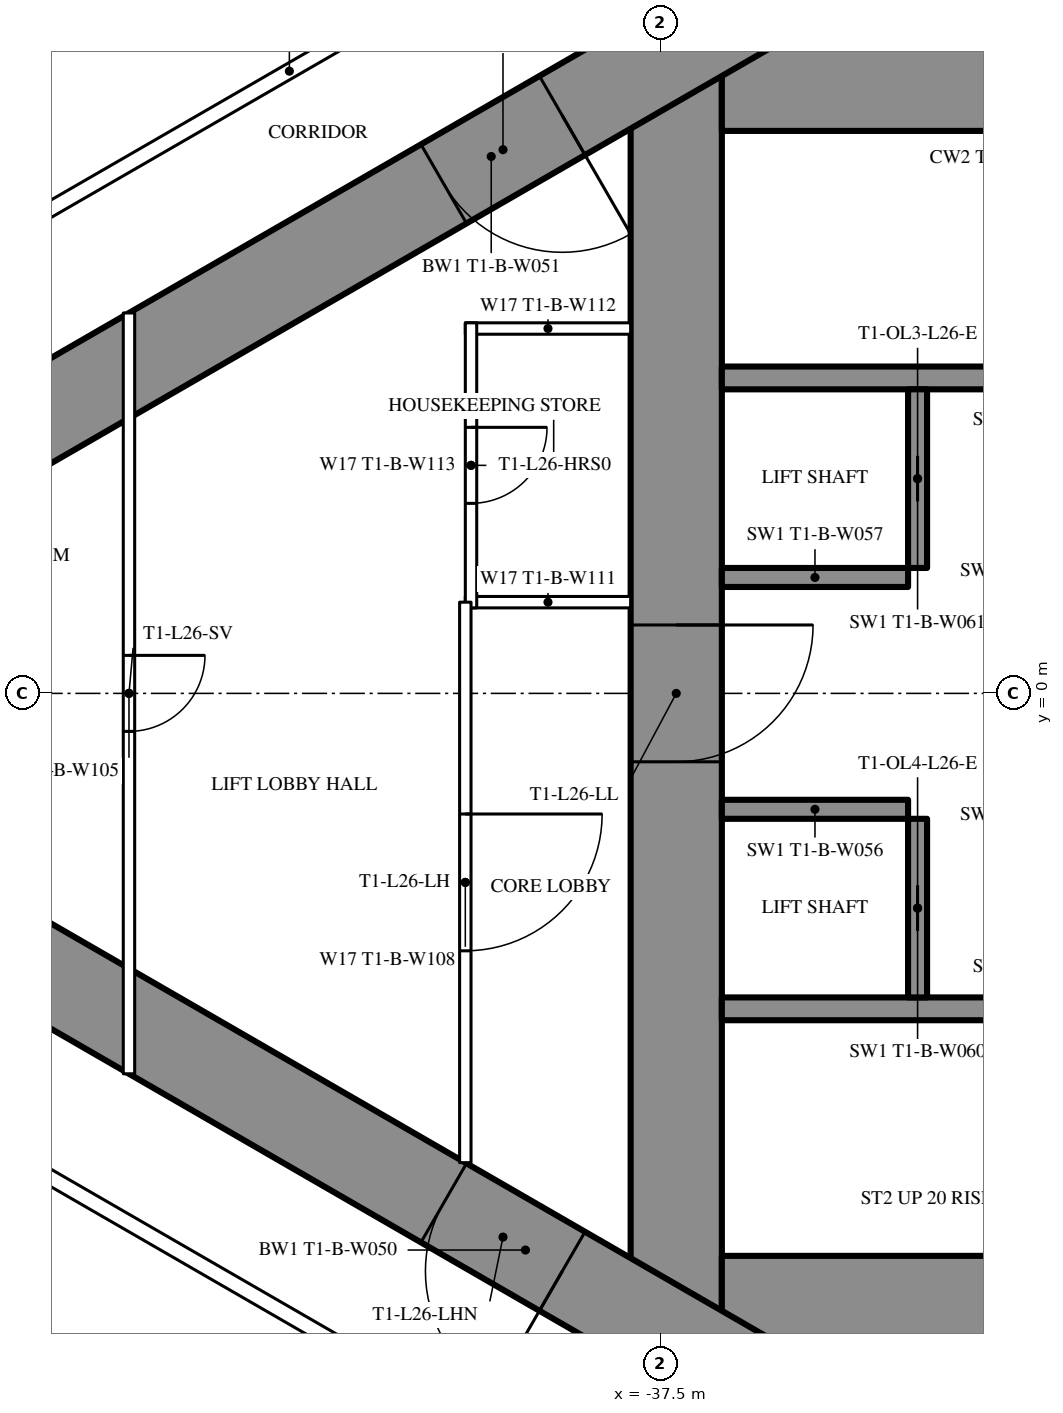
"""IFC4 building model, lengths in metres.
Left out: names, types, materials, properties, quantities, classifications, styles, units other than length and angle.
Written with IfcOpenShell. Run it as: python <this file> out.ifc"""

import sys

from ifc_helpers import new_model, si_unit, direction, frame, frame_2d, origin, place, context, subcontext, project, spatial, rectangle, extrude, element, fill, save


model = new_model("IFC4")
c1 = context("Model", 3, precision=1e-05, world=origin(), true_north=direction((0.0, 1.0)))
c2 = subcontext(c1, "Body", "Model", "MODEL_VIEW")
j1 = project(units=[si_unit("LENGTHUNIT", "METRE"), si_unit("PLANEANGLEUNIT", "RADIAN")], contexts=[c1])
p1 = place(None, origin())
s1 = spatial("IfcSite", under=j1, at=p1, CompositionType="ELEMENT")
p2 = place(p1, origin())
s2 = spatial("IfcBuilding", under=s1, at=p2, CompositionType="ELEMENT")
p3 = place(p2, frame((0.0, 0.0, 101.1)))
s3 = spatial("IfcBuildingStorey", under=s2, at=p3, CompositionType="ELEMENT", Elevation=101.1)
p4 = place(p3, frame((-37.3, 8.6, 0.0), z_axis=(0.0, 0.0, 1.0), x_axis=(0.0, -1.0, 0.0)))
e1 = element("IfcWall", 1, at=p4, inside=s3, PredefinedType="SHEAR", context=c2, shape_type="SweptSolid", body=[
    extrude(rectangle(XDim=17.2, YDim=1.2, at=frame_2d((8.6, 0.0))), origin(), (0.0, 0.0, 1.0), 3.5),
])
p5 = place(p4, frame((7.7, 0.0, 0.0)))
e2 = element("IfcOpeningElement", 2, at=p5, cuts=e1, PredefinedType="OPENING", context=c2, shape_type="SweptSolid", body=[
    extrude(rectangle(XDim=1.8, YDim=2.2, at=frame_2d((0.9, 1.1))), frame((0.0, 0.61, 0.0), z_axis=(0.0, -1.0, 0.0), x_axis=(1.0, 0.0, 0.0)), (0.0, 0.0, 1.0), 1.22),
])
p6 = place(p3, frame((-28.3, 8.0, 0.0), z_axis=(0.0, 0.0, 1.0), x_axis=(-1.0, 0.0, 0.0)))
e3 = element("IfcWall", 3, at=p6, inside=s3, PredefinedType="SHEAR", context=c2, shape_type="SweptSolid", body=[
    extrude(rectangle(XDim=8.4, YDim=1.2, at=frame_2d((4.2, 0.0))), origin(), (0.0, 0.0, 1.0), 3.5),
])
p7 = place(p6, frame((0.25, 0.0, 0.0)))
e4 = element("IfcOpeningElement", 4, at=p7, cuts=e3, PredefinedType="OPENING", context=c2, shape_type="SweptSolid", body=[
    extrude(rectangle(XDim=1.0, YDim=2.2, at=frame_2d((0.5, 1.1))), frame((0.0, 0.61, 0.0), z_axis=(0.0, -1.0, 0.0), x_axis=(1.0, 0.0, 0.0)), (0.0, 0.0, 1.0), 1.22),
])
p8 = place(p3, frame((-28.3, -8.0, 0.0), z_axis=(0.0, 0.0, 1.0), x_axis=(-1.0, 0.0, 0.0)))
e5 = element("IfcWall", 5, at=p8, inside=s3, PredefinedType="SHEAR", context=c2, shape_type="SweptSolid", body=[
    extrude(rectangle(XDim=8.4, YDim=1.2, at=frame_2d((4.2, 0.0))), origin(), (0.0, 0.0, 1.0), 3.5),
])
p9 = place(p8, frame((0.25, 0.0, 0.0)))
e6 = element("IfcOpeningElement", 6, at=p9, cuts=e5, PredefinedType="OPENING", context=c2, shape_type="SweptSolid", body=[
    extrude(rectangle(XDim=1.0, YDim=2.2, at=frame_2d((0.5, 1.1))), frame((0.0, 0.61, 0.0), z_axis=(0.0, -1.0, 0.0), x_axis=(1.0, 0.0, 0.0)), (0.0, 0.0, 1.0), 1.22),
])
for number, where, z_axis, x_axis in (
    (7, (-28.3, 4.15, 0.0), (0.0, 0.0, 1.0), (-1.0, 0.0, 0.0)),
    (8, (-28.3, -4.15, 0.0), (0.0, 0.0, 1.0), (-1.0, 0.0, 0.0)),
):
    element("IfcWall", number, at=place(p3, frame(where, z_axis=z_axis, x_axis=x_axis)), inside=s3, PredefinedType="SHEAR", context=c2, shape_type="SweptSolid", body=[
        extrude(rectangle(XDim=8.4, YDim=0.3, at=frame_2d((4.2, 0.0))), origin(), (0.0, 0.0, 1.0), 3.5),
    ])
p10 = place(p3, frame((-34.125, 4.0, 0.0), z_axis=(0.0, 0.0, 1.0), x_axis=(0.0, -1.0, 0.0)))
e9 = element("IfcWall", 9, at=p10, inside=s3, PredefinedType="SHEAR", context=c2, shape_type="SweptSolid", body=[
    extrude(rectangle(XDim=2.35, YDim=0.25, at=frame_2d((1.175, 0.0))), origin(), (0.0, 0.0, 1.0), 3.5),
])
p11 = place(p10, frame((0.875, 0.0, 0.0)))
e10 = element("IfcOpeningElement", 10, at=p11, cuts=e9, PredefinedType="OPENING", context=c2, shape_type="SweptSolid", body=[
    extrude(rectangle(XDim=0.6, YDim=2.0, at=frame_2d((0.3, 1.0))), frame((0.0, 0.135, 0.0), z_axis=(0.0, -1.0, 0.0), x_axis=(1.0, 0.0, 0.0)), (0.0, 0.0, 1.0), 0.27),
])
p12 = place(p3, frame((-34.25, 1.525, 0.0), z_axis=(0.0, 0.0, 1.0), x_axis=(-1.0, 0.0, 0.0)))
e11 = element("IfcWall", 11, at=p12, inside=s3, PredefinedType="SHEAR", context=c2, shape_type="SweptSolid", body=[
    extrude(rectangle(XDim=2.45, YDim=0.25, at=frame_2d((1.225, 0.0))), origin(), (0.0, 0.0, 1.0), 3.5),
])
p13 = place(p3, frame((-34.125, -1.65, 0.0), z_axis=(0.0, 0.0, 1.0), x_axis=(0.0, -1.0, 0.0)))
e12 = element("IfcWall", 12, at=p13, inside=s3, PredefinedType="SHEAR", context=c2, shape_type="SweptSolid", body=[
    extrude(rectangle(XDim=2.35, YDim=0.25, at=frame_2d((1.175, 0.0))), origin(), (0.0, 0.0, 1.0), 3.5),
])
p14 = place(p13, frame((0.875, 0.0, 0.0)))
e13 = element("IfcOpeningElement", 13, at=p14, cuts=e12, PredefinedType="OPENING", context=c2, shape_type="SweptSolid", body=[
    extrude(rectangle(XDim=0.6, YDim=2.0, at=frame_2d((0.3, 1.0))), frame((0.0, 0.135, 0.0), z_axis=(0.0, -1.0, 0.0), x_axis=(1.0, 0.0, 0.0)), (0.0, 0.0, 1.0), 0.27),
])
p15 = place(p3, frame((-34.25, -1.525, 0.0), z_axis=(0.0, 0.0, 1.0), x_axis=(-1.0, 0.0, 0.0)))
e14 = element("IfcWall", 14, at=p15, inside=s3, PredefinedType="SHEAR", context=c2, shape_type="SweptSolid", body=[
    extrude(rectangle(XDim=2.45, YDim=0.25, at=frame_2d((1.225, 0.0))), origin(), (0.0, 0.0, 1.0), 3.5),
])
p16 = place(p3, frame((-27.2, 14.3, 0.0), z_axis=(0.0, 0.0, 1.0), x_axis=(-0.866026593062, -0.499997940104, 0.0)))
e15 = element("IfcWall", 15, at=p16, inside=s3, PredefinedType="SHEAR", context=c2, shape_type="SweptSolid", body=[
    extrude(rectangle(XDim=28.946, YDim=1.2, at=frame_2d((14.473, 0.0))), origin(), (0.0, 0.0, 1.0), 3.5),
])
p17 = place(p16, frame((4.6, 0.0, 0.0)))
e16 = element("IfcOpeningElement", 16, at=p17, cuts=e15, PredefinedType="OPENING", context=c2, shape_type="SweptSolid", body=[
    extrude(rectangle(XDim=1.0, YDim=2.2, at=frame_2d((0.5, 1.1))), frame((0.0, 0.61, 0.0), z_axis=(0.0, -1.0, 0.0), x_axis=(1.0, 0.0, 0.0)), (0.0, 0.0, 1.0), 1.22),
])
p18 = place(p16, frame((13.395, 0.0, 0.0)))
e17 = element("IfcOpeningElement", 17, at=p18, cuts=e15, PredefinedType="OPENING", context=c2, shape_type="SweptSolid", body=[
    extrude(rectangle(XDim=1.8, YDim=2.2, at=frame_2d((0.9, 1.1))), frame((0.0, 0.61, 0.0), z_axis=(0.0, -1.0, 0.0), x_axis=(1.0, 0.0, 0.0)), (0.0, 0.0, 1.0), 1.22),
])
p19 = place(p3, frame((-27.2, -14.3, 0.0), z_axis=(0.0, 0.0, 1.0), x_axis=(-0.866024021859, 0.500002393557, 0.0)))
e18 = element("IfcWall", 18, at=p19, inside=s3, PredefinedType="SHEAR", context=c2, shape_type="SweptSolid", body=[
    extrude(rectangle(XDim=27.907, YDim=1.2, at=frame_2d((13.954, 0.0))), origin(), (0.0, 0.0, 1.0), 3.5),
])
p20 = place(p19, frame((4.6, 0.0, 0.0)))
e19 = element("IfcOpeningElement", 19, at=p20, cuts=e18, PredefinedType="OPENING", context=c2, shape_type="SweptSolid", body=[
    extrude(rectangle(XDim=1.0, YDim=2.2, at=frame_2d((0.5, 1.1))), frame((0.0, 0.61, 0.0), z_axis=(0.0, -1.0, 0.0), x_axis=(1.0, 0.0, 0.0)), (0.0, 0.0, 1.0), 1.22),
])
p21 = place(p19, frame((13.395, 0.0, 0.0)))
e20 = element("IfcOpeningElement", 20, at=p21, cuts=e18, PredefinedType="OPENING", context=c2, shape_type="SweptSolid", body=[
    extrude(rectangle(XDim=1.8, YDim=2.2, at=frame_2d((0.9, 1.1))), frame((0.0, 0.61, 0.0), z_axis=(0.0, -1.0, 0.0), x_axis=(1.0, 0.0, 0.0)), (0.0, 0.0, 1.0), 1.22),
])
p22 = place(p3, frame((-36.92, -11.344, 0.0), z_axis=(0.0, 0.0, 1.0), x_axis=(-0.866028313256, 0.499994960614, 0.0)))
e21 = element("IfcWall", 21, at=p22, inside=s3, PredefinedType="PARTITIONING", context=c2, shape_type="SweptSolid", body=[
    extrude(rectangle(XDim=22.568, YDim=0.2, at=frame_2d((11.284, 0.0))), origin(), (0.0, 0.0, 1.0), 3.25),
])
p23 = place(p22, frame((21.018, 0.0, 0.0)))
e22 = element("IfcOpeningElement", 22, at=p23, cuts=e21, PredefinedType="OPENING", context=c2, shape_type="SweptSolid", body=[
    extrude(rectangle(XDim=0.95, YDim=2.2, at=frame_2d((0.475, 1.1))), frame((0.0, 0.11, 0.0), z_axis=(0.0, -1.0, 0.0), x_axis=(1.0, 0.0, 0.0)), (0.0, 0.0, 1.0), 0.22),
])
p24 = place(p22, frame((3.35, 0.0, 0.0)))
e23 = element("IfcOpeningElement", 23, at=p24, cuts=e21, PredefinedType="OPENING", context=c2, shape_type="SweptSolid", body=[
    extrude(rectangle(XDim=1.0, YDim=2.2, at=frame_2d((0.5, 1.1))), frame((0.0, 0.11, 0.0), z_axis=(0.0, -1.0, 0.0), x_axis=(1.0, 0.0, 0.0)), (0.0, 0.0, 1.0), 0.22),
])
p25 = place(p3, frame((-37.7, 10.894, 0.0), z_axis=(0.0, 0.0, 1.0), x_axis=(-0.866027551079, -0.499996280759, 0.0)))
e24 = element("IfcWall", 24, at=p25, inside=s3, PredefinedType="PARTITIONING", context=c2, shape_type="SweptSolid", body=[
    extrude(rectangle(XDim=10.831, YDim=0.2, at=frame_2d((5.415, 0.0))), origin(), (0.0, 0.0, 1.0), 3.25),
])
p26 = place(p25, frame((0.6, 0.0, 0.0)))
e25 = element("IfcOpeningElement", 25, at=p26, cuts=e24, PredefinedType="OPENING", context=c2, shape_type="SweptSolid", body=[
    extrude(rectangle(XDim=0.95, YDim=2.2, at=frame_2d((0.475, 1.1))), frame((0.0, 0.11, 0.0), z_axis=(0.0, -1.0, 0.0), x_axis=(1.0, 0.0, 0.0)), (0.0, 0.0, 1.0), 0.22),
])
for number, where, z_axis, x_axis in (
    (26, (-37.9, 1.2, 0.0), (0.0, 0.0, 1.0), (-1.0, 0.0, 0.0)),
    (27, (-37.9, 4.8, 0.0), (0.0, 0.0, 1.0), (-1.0, 0.0, 0.0)),
):
    element("IfcWall", number, at=place(p3, frame(where, z_axis=z_axis, x_axis=x_axis)), inside=s3, PredefinedType="PARTITIONING", context=c2, shape_type="SweptSolid", body=[
        extrude(rectangle(XDim=2.175, YDim=0.15, at=frame_2d((1.087, 0.0))), origin(), (0.0, 0.0, 1.0), 3.25),
    ])
p27 = place(p3, frame((-40.0, 4.875, 0.0), z_axis=(0.0, 0.0, 1.0), x_axis=(0.0, -1.0, 0.0)))
e28 = element("IfcWall", 28, at=p27, inside=s3, PredefinedType="PARTITIONING", context=c2, shape_type="SweptSolid", body=[
    extrude(rectangle(XDim=3.75, YDim=0.15, at=frame_2d((1.875, 0.0))), origin(), (0.0, 0.0, 1.0), 3.25),
])
p28 = place(p27, frame((1.375, 0.0, 0.0)))
e29 = element("IfcOpeningElement", 29, at=p28, cuts=e28, PredefinedType="OPENING", context=c2, shape_type="SweptSolid", body=[
    extrude(rectangle(XDim=1.0, YDim=2.2, at=frame_2d((0.5, 1.1))), frame((0.0, 0.085, 0.0), z_axis=(0.0, -1.0, 0.0), x_axis=(1.0, 0.0, 0.0)), (0.0, 0.0, 1.0), 0.17),
])
p29 = place(p3, frame((-40.075, 1.2, 0.0), z_axis=(0.0, 0.0, 1.0), x_axis=(0.0, -1.0, 0.0)))
e30 = element("IfcWall", 30, at=p29, inside=s3, PredefinedType="PARTITIONING", context=c2, shape_type="SweptSolid", body=[
    extrude(rectangle(XDim=7.374, YDim=0.15, at=frame_2d((3.687, 0.0))), origin(), (0.0, 0.0, 1.0), 3.25),
])
p30 = place(p29, frame((2.787, 0.0, 0.0)))
e31 = element("IfcOpeningElement", 31, at=p30, cuts=e30, PredefinedType="OPENING", context=c2, shape_type="SweptSolid", body=[
    extrude(rectangle(XDim=1.8, YDim=2.2, at=frame_2d((0.9, 1.1))), frame((0.0, 0.085, 0.0), z_axis=(0.0, -1.0, 0.0), x_axis=(1.0, 0.0, 0.0)), (0.0, 0.0, 1.0), 0.17),
])
p31 = place(p3, frame((-44.5, 5.005, 0.0), z_axis=(0.0, 0.0, 1.0), x_axis=(0.0, -1.0, 0.0)))
e32 = element("IfcWall", 32, at=p31, inside=s3, PredefinedType="PARTITIONING", context=c2, shape_type="SweptSolid", body=[
    extrude(rectangle(XDim=10.009, YDim=0.15, at=frame_2d((5.005, 0.0))), origin(), (0.0, 0.0, 1.0), 2.45),
])
p32 = place(p31, frame((4.505, 0.0, 0.0)))
e33 = element("IfcOpeningElement", 33, at=p32, cuts=e32, PredefinedType="OPENING", context=c2, shape_type="SweptSolid", body=[
    extrude(rectangle(XDim=1.0, YDim=2.2, at=frame_2d((0.5, 1.1))), frame((0.0, 0.085, 0.0), z_axis=(0.0, -1.0, 0.0), x_axis=(1.0, 0.0, 0.0)), (0.0, 0.0, 1.0), 0.17),
])
p33 = place(p28, origin())
e34 = element("IfcDoor", 34, at=p33, inside=s3, OperationType="SINGLE_SWING_LEFT", PredefinedType="DOOR", context=c2, shape_type="SweptSolid", body=[
    extrude(rectangle(XDim=1.0, YDim=2.2, at=frame_2d((0.5, 1.1))), frame((0.0, 0.025, 0.0), z_axis=(0.0, -1.0, 0.0), x_axis=(1.0, 0.0, 0.0)), (0.0, 0.0, 1.0), 0.05),
])
fill(e29, e34)
p34 = place(p30, origin())
e35 = element("IfcDoor", 35, at=p34, inside=s3, OperationType="DOUBLE_DOOR_SINGLE_SWING", PredefinedType="DOOR", context=c2, shape_type="SweptSolid", body=[
    extrude(rectangle(XDim=1.8, YDim=2.2, at=frame_2d((0.9, 1.1))), frame((0.0, 0.025, 0.0), z_axis=(0.0, -1.0, 0.0), x_axis=(1.0, 0.0, 0.0)), (0.0, 0.0, 1.0), 0.05),
])
fill(e31, e35)
p35 = place(p32, origin())
e36 = element("IfcDoor", 36, at=p35, inside=s3, OperationType="SINGLE_SWING_LEFT", PredefinedType="DOOR", context=c2, shape_type="SweptSolid", body=[
    extrude(rectangle(XDim=1.0, YDim=2.2, at=frame_2d((0.5, 1.1))), frame((0.0, 0.025, 0.0), z_axis=(0.0, -1.0, 0.0), x_axis=(1.0, 0.0, 0.0)), (0.0, 0.0, 1.0), 0.05),
])
fill(e33, e36)
p36 = place(p18, origin())
e37 = element("IfcDoor", 37, at=p36, inside=s3, OperationType="DOUBLE_DOOR_SINGLE_SWING", PredefinedType="DOOR", context=c2, shape_type="SweptSolid", body=[
    extrude(rectangle(XDim=1.8, YDim=2.2, at=frame_2d((0.9, 1.1))), frame((0.0, 0.025, 0.0), z_axis=(0.0, -1.0, 0.0), x_axis=(1.0, 0.0, 0.0)), (0.0, 0.0, 1.0), 0.05),
])
fill(e17, e37)
p37 = place(p21, origin())
e38 = element("IfcDoor", 38, at=p37, inside=s3, OperationType="DOUBLE_DOOR_SINGLE_SWING", PredefinedType="DOOR", context=c2, shape_type="SweptSolid", body=[
    extrude(rectangle(XDim=1.8, YDim=2.2, at=frame_2d((0.9, 1.1))), frame((0.0, 0.025, 0.0), z_axis=(0.0, -1.0, 0.0), x_axis=(1.0, 0.0, 0.0)), (0.0, 0.0, 1.0), 0.05),
])
fill(e20, e38)
p38 = place(p5, origin())
e39 = element("IfcDoor", 39, at=p38, inside=s3, OperationType="DOUBLE_DOOR_SINGLE_SWING", PredefinedType="DOOR", context=c2, shape_type="SweptSolid", body=[
    extrude(rectangle(XDim=1.8, YDim=2.2, at=frame_2d((0.9, 1.1))), frame((0.0, 0.025, 0.0), z_axis=(0.0, -1.0, 0.0), x_axis=(1.0, 0.0, 0.0)), (0.0, 0.0, 1.0), 0.05),
])
fill(e2, e39)
p39 = place(p11, origin())
e40 = element("IfcDoor", 40, at=p39, inside=s3, OperationType="SLIDING_TO_LEFT", PredefinedType="DOOR", context=c2, shape_type="SweptSolid", body=[
    extrude(rectangle(XDim=0.6, YDim=2.0, at=frame_2d((0.3, 1.0))), frame((0.0, 0.025, 0.0), z_axis=(0.0, -1.0, 0.0), x_axis=(1.0, 0.0, 0.0)), (0.0, 0.0, 1.0), 0.05),
])
fill(e10, e40)
p40 = place(p14, origin())
e41 = element("IfcDoor", 41, at=p40, inside=s3, OperationType="SLIDING_TO_LEFT", PredefinedType="DOOR", context=c2, shape_type="SweptSolid", body=[
    extrude(rectangle(XDim=0.6, YDim=2.0, at=frame_2d((0.3, 1.0))), frame((0.0, 0.025, 0.0), z_axis=(0.0, -1.0, 0.0), x_axis=(1.0, 0.0, 0.0)), (0.0, 0.0, 1.0), 0.05),
])
fill(e13, e41)
save(model, sys.argv[1])
